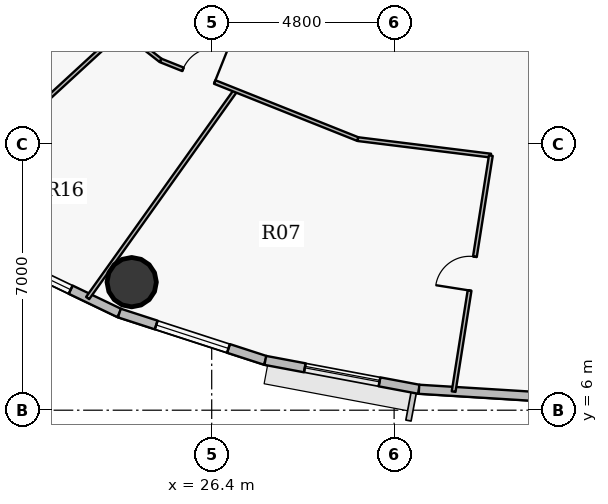
"""IFC4 building model, lengths in metres.
Left out: names, types, materials, properties, quantities, classifications, styles, units other than length and angle.
Written with IfcOpenShell. Run it as: python <this file> out.ifc"""

import sys

from ifc_helpers import new_model, si_unit, direction, frame, frame_2d, origin, origin_2d, place, context, subcontext, project, spatial, rectangle, hollow_circle, extrude, source, transform, mapped, element, fill, save


model = new_model("IFC4")
c1 = context("Model", 3, precision=1e-05, world=origin(), true_north=direction((0.0, 1.0)))
c2 = subcontext(c1, "Body", "Model", "MODEL_VIEW")
j1 = project(units=[si_unit("LENGTHUNIT", "METRE"), si_unit("PLANEANGLEUNIT", "RADIAN")], contexts=[c1])
p1 = place(None, origin())
s1 = spatial("IfcSite", under=j1, at=p1, CompositionType="ELEMENT")
p2 = place(p1, origin())
s2 = spatial("IfcBuilding", under=s1, at=p2, CompositionType="ELEMENT")
p3 = place(p2, frame((0.0, 0.0, 197.4)))
s3 = spatial("IfcBuildingStorey", under=s2, at=p3, CompositionType="ELEMENT", Elevation=197.4)
p4 = place(p3, frame((24.294, 9.369, 0.0), z_axis=(0.0, 0.0, 1.0), x_axis=(1.0, 0.0, 0.0)))
e1 = element("IfcColumn", 1, at=p4, inside=s3, PredefinedType="COLUMN", context=c2, shape_type="SweptSolid", body=[
    extrude(hollow_circle(Radius=0.65, WallThickness=0.04, at=origin_2d()), origin(), (0.0, 0.0, 1.0), 3.75),
])
p5 = place(p3, frame((23.97, 8.556, 0.0), z_axis=(0.0, 0.0, 1.0), x_axis=(-0.901564733809, 0.432644231155, 0.0)))
e2 = element("IfcWall", 2, at=p5, inside=s3, PredefinedType="SOLIDWALL", context=c2, shape_type="SweptSolid", body=[
    extrude(rectangle(XDim=3.93, YDim=0.24, at=frame_2d((1.965, 0.0))), origin(), (0.0, 0.0, 1.0), 3.5),
])
p6 = place(p5, frame((1.421, 0.0, 0.9)))
e3 = element("IfcOpeningElement", 3, at=p6, cuts=e2, PredefinedType="OPENING", context=c2, shape_type="SweptSolid", body=[
    extrude(rectangle(XDim=1.6, YDim=1.75, at=origin_2d()), frame((0.8, 0.13, 0.875), z_axis=(0.0, -1.0, 0.0), x_axis=(1.0, 0.0, 0.0)), (0.0, 0.0, 1.0), 0.26),
])
p7 = place(p3, frame((27.811, 7.311, 0.0), z_axis=(0.0, 0.0, 1.0), x_axis=(-0.951209870236, 0.30854462038, 0.0)))
e4 = element("IfcWall", 4, at=p7, inside=s3, PredefinedType="SOLIDWALL", context=c2, shape_type="SweptSolid", body=[
    extrude(rectangle(XDim=4.038, YDim=0.24, at=frame_2d((2.019, 0.0))), origin(), (0.0, 0.0, 1.0), 3.5),
])
p8 = place(p7, frame((1.019, 0.0, 0.9)))
e5 = element("IfcOpeningElement", 5, at=p8, cuts=e4, PredefinedType="OPENING", context=c2, shape_type="SweptSolid", body=[
    extrude(rectangle(XDim=2.0, YDim=1.75, at=origin_2d()), frame((1.0, 0.13, 0.875), z_axis=(0.0, -1.0, 0.0), x_axis=(1.0, 0.0, 0.0)), (0.0, 0.0, 1.0), 0.26),
])
p9 = place(p3, frame((31.854, 6.551, 0.0), z_axis=(0.0, 0.0, 1.0), x_axis=(-0.982788108205, 0.184736391573, 0.0)))
e6 = element("IfcWall", 6, at=p9, inside=s3, PredefinedType="SOLIDWALL", context=c2, shape_type="SweptSolid", body=[
    extrude(rectangle(XDim=4.114, YDim=0.24, at=frame_2d((2.057, 0.0))), origin(), (0.0, 0.0, 1.0), 3.5),
])
p10 = place(p9, frame((1.057, 0.0, 0.9)))
e7 = element("IfcOpeningElement", 7, at=p10, cuts=e6, PredefinedType="OPENING", context=c2, shape_type="SweptSolid", body=[
    extrude(rectangle(XDim=2.0, YDim=1.75, at=origin_2d()), frame((1.0, 0.13, 0.875), z_axis=(0.0, -1.0, 0.0), x_axis=(1.0, 0.0, 0.0)), (0.0, 0.0, 1.0), 0.26),
])
p11 = place(p3, frame((36.0, 6.295, 0.0), z_axis=(0.0, 0.0, 1.0), x_axis=(-0.998104600619, 0.061540281305, 0.0)))
e8 = element("IfcWall", 8, at=p11, inside=s3, PredefinedType="SOLIDWALL", context=c2, shape_type="SweptSolid", body=[
    extrude(rectangle(XDim=4.154, YDim=0.24, at=frame_2d((2.077, 0.0))), origin(), (0.0, 0.0, 1.0), 3.5),
])
p12 = place(p3, frame((18.899, 11.272, 0.0), z_axis=(0.0, 0.0, 1.0), x_axis=(0.736047362481, 0.676930040834, 0.0)))
e9 = element("IfcWall", 9, at=p12, inside=s3, PredefinedType="PARTITIONING", context=c2, shape_type="SweptSolid", body=[
    extrude(rectangle(XDim=6.983, YDim=0.1, at=frame_2d((3.492, 0.0))), origin(), (0.0, 0.0, 1.0), 2.935),
])
p13 = place(p3, frame((20.936, 18.429, 0.0), z_axis=(0.0, 0.0, 1.0), x_axis=(0.787322805473, -0.61654099619, 0.0)))
e10 = element("IfcWall", 10, at=p13, inside=s3, PredefinedType="PARTITIONING", context=c2, shape_type="SweptSolid", body=[
    extrude(rectangle(XDim=5.232, YDim=0.1, at=frame_2d((2.616, 0.0))), origin(), (0.0, 0.0, 1.0), 2.935),
])
p14 = place(p13, frame((1.541, 0.0, 0.0)))
e11 = element("IfcOpeningElement", 11, at=p14, cuts=e10, PredefinedType="OPENING", context=c2, shape_type="SweptSolid", body=[
    extrude(rectangle(XDim=0.9, YDim=2.1, at=origin_2d()), frame((0.45, 0.06, 1.05), z_axis=(0.0, -1.0, 0.0), x_axis=(1.0, 0.0, 0.0)), (0.0, 0.0, 1.0), 0.12),
])
p15 = place(p3, frame((23.136, 8.951, 0.0), z_axis=(0.0, 0.0, 1.0), x_axis=(0.580415349728, 0.814320589081, 0.0)))
e12 = element("IfcWall", 12, at=p15, inside=s3, PredefinedType="PARTITIONING", context=c2, shape_type="SweptSolid", body=[
    extrude(rectangle(XDim=6.71, YDim=0.1, at=frame_2d((3.355, 0.0))), origin(), (0.0, 0.0, 1.0), 2.935),
])
p16 = place(p3, frame((25.055, 15.204, 0.0), z_axis=(0.0, 0.0, 1.0), x_axis=(0.928798710424, -0.370584613166, 0.0)))
e13 = element("IfcWall", 13, at=p16, inside=s3, PredefinedType="PARTITIONING", context=c2, shape_type="SweptSolid", body=[
    extrude(rectangle(XDim=5.589, YDim=0.1, at=frame_2d((2.794, 0.0))), origin(), (0.0, 0.0, 1.0), 2.935),
])
p17 = place(p16, frame((0.633, 0.0, 0.0)))
e14 = element("IfcOpeningElement", 14, at=p17, cuts=e13, PredefinedType="OPENING", context=c2, shape_type="SweptSolid", body=[
    extrude(rectangle(XDim=0.9, YDim=2.1, at=origin_2d()), frame((0.45, 0.06, 1.05), z_axis=(0.0, -1.0, 0.0), x_axis=(1.0, 0.0, 0.0)), (0.0, 0.0, 1.0), 0.12),
])
p18 = place(p3, frame((30.246, 13.133, 0.0), z_axis=(0.0, 0.0, 1.0), x_axis=(0.992402005927, -0.123037630959, 0.0)))
e15 = element("IfcWall", 15, at=p18, inside=s3, PredefinedType="PARTITIONING", context=c2, shape_type="SweptSolid", body=[
    extrude(rectangle(XDim=3.526, YDim=0.1, at=frame_2d((1.763, 0.0))), origin(), (0.0, 0.0, 1.0), 3.5),
])
p19 = place(p3, frame((32.766, 6.489, 0.0), z_axis=(0.0, 0.0, 1.0), x_axis=(0.155739200194, 0.987798208909, 0.0)))
e16 = element("IfcWall", 16, at=p19, inside=s3, PredefinedType="PARTITIONING", context=c2, shape_type="SweptSolid", body=[
    extrude(rectangle(XDim=6.286, YDim=0.1, at=frame_2d((3.143, 0.0))), origin(), (0.0, 0.0, 1.0), 2.935),
])
p20 = place(p19, frame((2.693, 0.0, 0.0)))
e17 = element("IfcOpeningElement", 17, at=p20, cuts=e16, PredefinedType="OPENING", context=c2, shape_type="SweptSolid", body=[
    extrude(rectangle(XDim=0.9, YDim=2.1, at=origin_2d()), frame((0.45, 0.06, 1.05), z_axis=(0.0, -1.0, 0.0), x_axis=(1.0, 0.0, 0.0)), (0.0, 0.0, 1.0), 0.12),
])
m1 = source(origin(), c2, "Body", "SweptSolid", [
    extrude(rectangle(XDim=1.6, YDim=1.75, at=origin_2d()), frame((0.8, 0.03, 0.875), z_axis=(0.0, -1.0, 0.0), x_axis=(1.0, 0.0, 0.0)), (0.0, 0.0, 1.0), 0.06),
])
p21 = place(p6, origin())
e18 = element("IfcWindow", 18, at=p21, inside=s3, PartitioningType="DOUBLE_PANEL_VERTICAL", PredefinedType="WINDOW", context=c2, shape_type="MappedRepresentation", body=[
    mapped(m1, transform((0.0, 0.0, 0.0), x_axis=(1.0, 0.0, 0.0), y_axis=(0.0, 1.0, 0.0), z_axis=(0.0, 0.0, 1.0), scale=1.0)),
])
fill(e3, e18)
m2 = source(origin(), c2, "Body", "SweptSolid", [
    extrude(rectangle(XDim=2.0, YDim=1.75, at=origin_2d()), frame((1.0, 0.03, 0.875), z_axis=(0.0, -1.0, 0.0), x_axis=(1.0, 0.0, 0.0)), (0.0, 0.0, 1.0), 0.06),
])
p22 = place(p8, origin())
e19 = element("IfcWindow", 19, at=p22, inside=s3, PartitioningType="DOUBLE_PANEL_VERTICAL", PredefinedType="WINDOW", context=c2, shape_type="MappedRepresentation", body=[
    mapped(m2, transform((0.0, 0.0, 0.0), x_axis=(1.0, 0.0, 0.0), y_axis=(0.0, 1.0, 0.0), z_axis=(0.0, 0.0, 1.0), scale=1.0)),
])
fill(e5, e19)
p23 = place(p10, origin())
e20 = element("IfcWindow", 20, at=p23, inside=s3, PartitioningType="DOUBLE_PANEL_VERTICAL", PredefinedType="WINDOW", context=c2, shape_type="MappedRepresentation", body=[
    mapped(m2, transform((0.0, 0.0, 0.0), x_axis=(1.0, 0.0, 0.0), y_axis=(0.0, 1.0, 0.0), z_axis=(0.0, 0.0, 1.0), scale=1.0)),
])
fill(e7, e20)
m3 = source(origin(), c2, "Body", "SweptSolid", [
    extrude(rectangle(XDim=0.9, YDim=2.1, at=origin_2d()), frame((0.45, 0.025, 1.05), z_axis=(0.0, -1.0, 0.0), x_axis=(1.0, 0.0, 0.0)), (0.0, 0.0, 1.0), 0.05),
])
p24 = place(p17, origin())
e21 = element("IfcDoor", 21, at=p24, inside=s3, OperationType="SINGLE_SWING_RIGHT", PredefinedType="DOOR", context=c2, shape_type="MappedRepresentation", body=[
    mapped(m3, transform((0.0, 0.0, 0.0), x_axis=(1.0, 0.0, 0.0), y_axis=(0.0, 1.0, 0.0), z_axis=(0.0, 0.0, 1.0), scale=1.0)),
])
fill(e14, e21)
p25 = place(p20, origin())
e22 = element("IfcDoor", 22, at=p25, inside=s3, OperationType="SINGLE_SWING_LEFT", PredefinedType="DOOR", context=c2, shape_type="MappedRepresentation", body=[
    mapped(m3, transform((0.0, 0.0, 0.0), x_axis=(1.0, 0.0, 0.0), y_axis=(0.0, 1.0, 0.0), z_axis=(0.0, 0.0, 1.0), scale=1.0)),
])
fill(e17, e22)
save(model, sys.argv[1])
